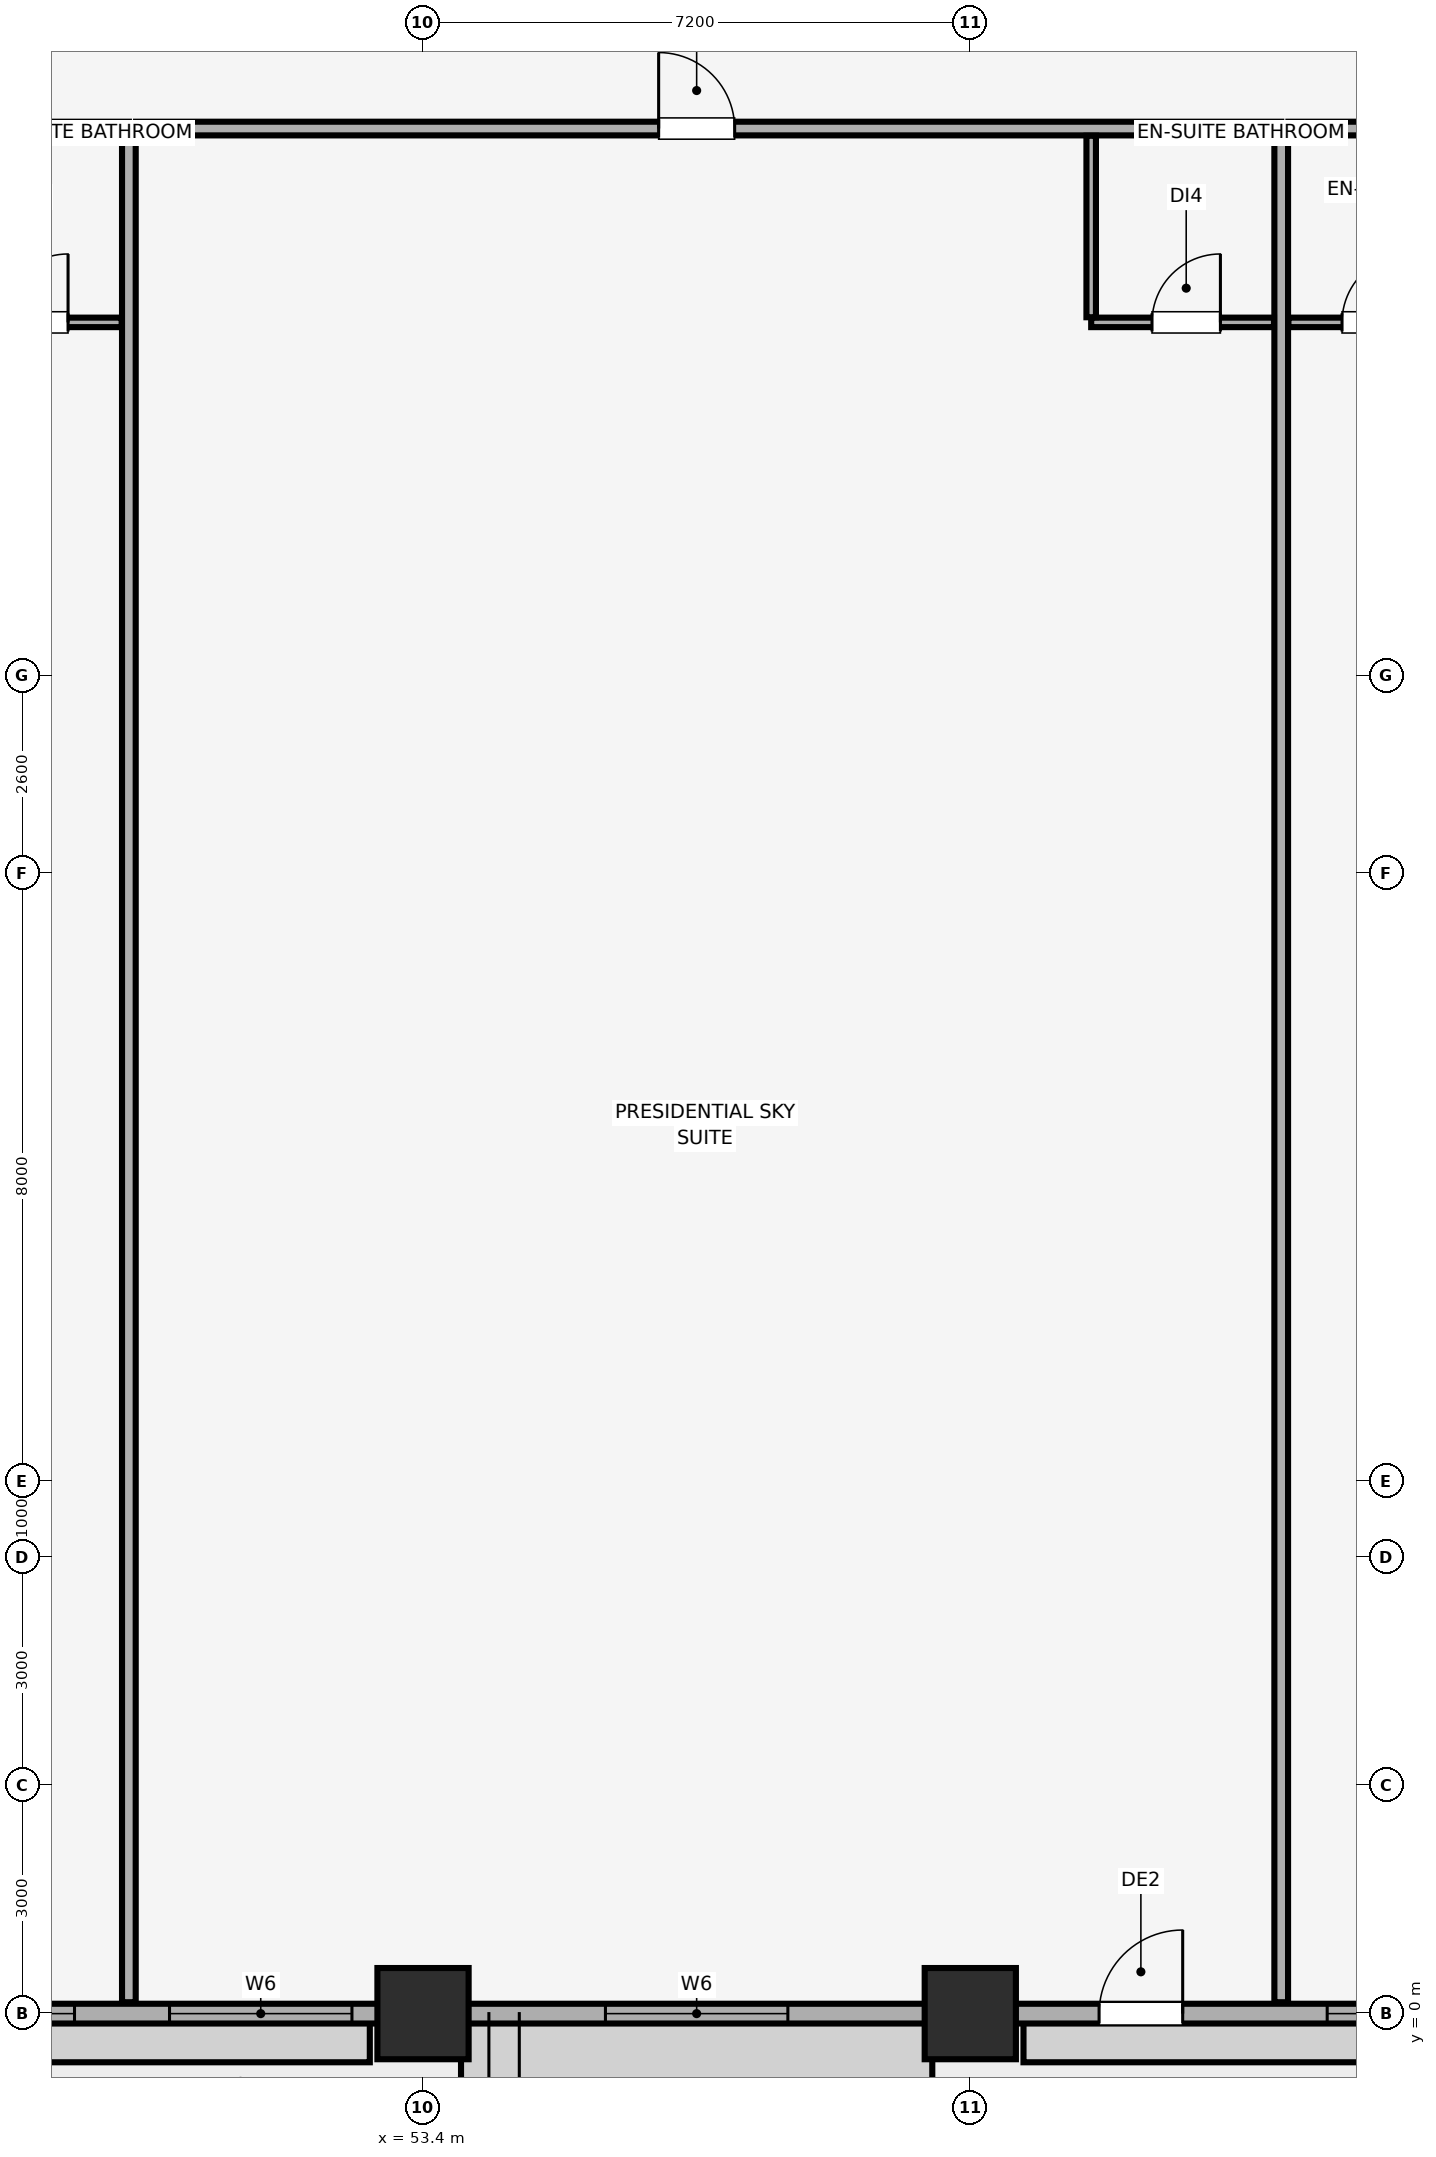
"""IFC4 building model, lengths in metres.
Left out: names, types, materials, properties, quantities, classifications, styles, units other than length and angle.
Written with IfcOpenShell. Run it as: python <this file> out.ifc"""

import sys

from ifc_helpers import new_model, si_unit, direction, frame, frame_2d, origin, origin_2d, place, context, subcontext, project, spatial, rectangle, extrude, element, fill, save


model = new_model("IFC4")
c1 = context("Model", 3, precision=1e-05, world=origin(), true_north=direction((0.0, 1.0)))
c2 = subcontext(c1, "Body", "Model", "MODEL_VIEW")
j1 = project(units=[si_unit("LENGTHUNIT", "METRE"), si_unit("PLANEANGLEUNIT", "RADIAN")], contexts=[c1])
p1 = place(None, origin())
s1 = spatial("IfcSite", under=j1, at=p1, CompositionType="ELEMENT")
p2 = place(p1, origin())
s2 = spatial("IfcBuilding", under=s1, at=p2, CompositionType="ELEMENT")
p3 = place(p2, frame((0.0, 0.0, 126.8)))
s3 = spatial("IfcBuildingStorey", under=s2, at=p3, CompositionType="ELEMENT", Elevation=126.8)
for number, where, z_axis, x_axis in (
    (1, (53.4, 0.0, 0.0), (0.0, 0.0, 1.0), (1.0, 0.0, 0.0)),
    (2, (60.6, 0.0, 0.0), (0.0, 0.0, 1.0), (1.0, 0.0, 0.0)),
):
    element("IfcColumn", number, at=place(p3, frame(where, z_axis=z_axis, x_axis=x_axis)), inside=s3, PredefinedType="COLUMN", context=c2, shape_type="SweptSolid", body=[
        extrude(rectangle(XDim=1.2, YDim=1.2, at=origin_2d()), origin(), (0.0, 0.0, 1.0), 3.51),
    ])
p4 = place(p3, frame((4.2, 0.0, 0.0), z_axis=(0.0, 0.0, 1.0), x_axis=(1.0, 0.0, 0.0)))
e3 = element("IfcWall", 3, at=p4, inside=s3, PredefinedType="SOLIDWALL", context=c2, shape_type="SweptSolid", body=[
    extrude(rectangle(XDim=75.6, YDim=0.26, at=frame_2d((37.8, 0.0))), origin(), (0.0, 0.0, 1.0), 2.56),
])
p5 = place(p4, frame((21.383, 0.0, 0.0)))
e4 = element("IfcOpeningElement", 4, at=p5, cuts=e3, PredefinedType="OPENING", context=c2, shape_type="SweptSolid", body=[
    extrude(rectangle(XDim=1.1, YDim=2.15, at=frame_2d((0.55, 1.075))), frame((0.0, 0.14, 0.0), z_axis=(0.0, -1.0, 0.0), x_axis=(1.0, 0.0, 0.0)), (0.0, 0.0, 1.0), 0.28),
])
p6 = place(p4, frame((36.432, 0.0, 0.0)))
e5 = element("IfcOpeningElement", 5, at=p6, cuts=e3, PredefinedType="OPENING", context=c2, shape_type="SweptSolid", body=[
    extrude(rectangle(XDim=1.1, YDim=2.15, at=frame_2d((0.55, 1.075))), frame((0.0, 0.14, 0.0), z_axis=(0.0, -1.0, 0.0), x_axis=(1.0, 0.0, 0.0)), (0.0, 0.0, 1.0), 0.28),
])
p7 = place(p4, frame((58.094, 0.0, 0.0)))
e6 = element("IfcOpeningElement", 6, at=p7, cuts=e3, PredefinedType="OPENING", context=c2, shape_type="SweptSolid", body=[
    extrude(rectangle(XDim=1.1, YDim=2.15, at=frame_2d((0.55, 1.075))), frame((0.0, 0.14, 0.0), z_axis=(0.0, -1.0, 0.0), x_axis=(1.0, 0.0, 0.0)), (0.0, 0.0, 1.0), 0.28),
])
p8 = place(p4, frame((1.035, 0.0, 0.85)))
e7 = element("IfcOpeningElement", 7, at=p8, cuts=e3, PredefinedType="OPENING", context=c2, shape_type="SweptSolid", body=[
    extrude(rectangle(XDim=2.4, YDim=1.5, at=frame_2d((1.2, 0.75))), frame((0.0, 0.14, 0.0), z_axis=(0.0, -1.0, 0.0), x_axis=(1.0, 0.0, 0.0)), (0.0, 0.0, 1.0), 0.28),
])
p9 = place(p4, frame((7.2, 0.0, 0.85)))
e8 = element("IfcOpeningElement", 8, at=p9, cuts=e3, PredefinedType="OPENING", context=c2, shape_type="SweptSolid", body=[
    extrude(rectangle(XDim=2.4, YDim=1.5, at=frame_2d((1.2, 0.75))), frame((0.0, 0.14, 0.0), z_axis=(0.0, -1.0, 0.0), x_axis=(1.0, 0.0, 0.0)), (0.0, 0.0, 1.0), 0.28),
])
p10 = place(p4, frame((13.055, 0.0, 0.85)))
e9 = element("IfcOpeningElement", 9, at=p10, cuts=e3, PredefinedType="OPENING", context=c2, shape_type="SweptSolid", body=[
    extrude(rectangle(XDim=1.5, YDim=1.4, at=frame_2d((0.75, 0.7))), frame((0.0, 0.14, 0.0), z_axis=(0.0, -1.0, 0.0), x_axis=(1.0, 0.0, 0.0)), (0.0, 0.0, 1.0), 0.28),
])
p11 = place(p4, frame((15.805, 0.0, 0.85)))
e10 = element("IfcOpeningElement", 10, at=p11, cuts=e3, PredefinedType="OPENING", context=c2, shape_type="SweptSolid", body=[
    extrude(rectangle(XDim=2.4, YDim=1.5, at=frame_2d((1.2, 0.75))), frame((0.0, 0.14, 0.0), z_axis=(0.0, -1.0, 0.0), x_axis=(1.0, 0.0, 0.0)), (0.0, 0.0, 1.0), 0.28),
])
p12 = place(p4, frame((23.127, 0.0, 0.85)))
e11 = element("IfcOpeningElement", 11, at=p12, cuts=e3, PredefinedType="OPENING", context=c2, shape_type="SweptSolid", body=[
    extrude(rectangle(XDim=2.4, YDim=1.5, at=frame_2d((1.2, 0.75))), frame((0.0, 0.14, 0.0), z_axis=(0.0, -1.0, 0.0), x_axis=(1.0, 0.0, 0.0)), (0.0, 0.0, 1.0), 0.28),
])
p13 = place(p4, frame((27.285, 0.0, 0.85)))
e12 = element("IfcOpeningElement", 12, at=p13, cuts=e3, PredefinedType="OPENING", context=c2, shape_type="SweptSolid", body=[
    extrude(rectangle(XDim=2.4, YDim=1.5, at=frame_2d((1.2, 0.75))), frame((0.0, 0.14, 0.0), z_axis=(0.0, -1.0, 0.0), x_axis=(1.0, 0.0, 0.0)), (0.0, 0.0, 1.0), 0.28),
])
p14 = place(p4, frame((30.935, 0.0, 0.85)))
e13 = element("IfcOpeningElement", 13, at=p14, cuts=e3, PredefinedType="OPENING", context=c2, shape_type="SweptSolid", body=[
    extrude(rectangle(XDim=1.5, YDim=1.4, at=frame_2d((0.75, 0.7))), frame((0.0, 0.14, 0.0), z_axis=(0.0, -1.0, 0.0), x_axis=(1.0, 0.0, 0.0)), (0.0, 0.0, 1.0), 0.28),
])
p15 = place(p4, frame((38.451, 0.0, 0.85)))
e14 = element("IfcOpeningElement", 14, at=p15, cuts=e3, PredefinedType="OPENING", context=c2, shape_type="SweptSolid", body=[
    extrude(rectangle(XDim=2.4, YDim=1.5, at=frame_2d((1.2, 0.75))), frame((0.0, 0.14, 0.0), z_axis=(0.0, -1.0, 0.0), x_axis=(1.0, 0.0, 0.0)), (0.0, 0.0, 1.0), 0.28),
])
p16 = place(p4, frame((43.115, 0.0, 0.85)))
e15 = element("IfcOpeningElement", 15, at=p16, cuts=e3, PredefinedType="OPENING", context=c2, shape_type="SweptSolid", body=[
    extrude(rectangle(XDim=1.5, YDim=1.4, at=frame_2d((0.75, 0.7))), frame((0.0, 0.14, 0.0), z_axis=(0.0, -1.0, 0.0), x_axis=(1.0, 0.0, 0.0)), (0.0, 0.0, 1.0), 0.28),
])
p17 = place(p4, frame((45.865, 0.0, 0.85)))
e16 = element("IfcOpeningElement", 16, at=p17, cuts=e3, PredefinedType="OPENING", context=c2, shape_type="SweptSolid", body=[
    extrude(rectangle(XDim=2.4, YDim=1.5, at=frame_2d((1.2, 0.75))), frame((0.0, 0.14, 0.0), z_axis=(0.0, -1.0, 0.0), x_axis=(1.0, 0.0, 0.0)), (0.0, 0.0, 1.0), 0.28),
])
p18 = place(p4, frame((51.6, 0.0, 0.85)))
e17 = element("IfcOpeningElement", 17, at=p18, cuts=e3, PredefinedType="OPENING", context=c2, shape_type="SweptSolid", body=[
    extrude(rectangle(XDim=2.4, YDim=1.5, at=frame_2d((1.2, 0.75))), frame((0.0, 0.14, 0.0), z_axis=(0.0, -1.0, 0.0), x_axis=(1.0, 0.0, 0.0)), (0.0, 0.0, 1.0), 0.28),
])
p19 = place(p4, frame((61.095, 0.0, 0.85)))
e18 = element("IfcOpeningElement", 18, at=p19, cuts=e3, PredefinedType="OPENING", context=c2, shape_type="SweptSolid", body=[
    extrude(rectangle(XDim=1.5, YDim=1.4, at=frame_2d((0.75, 0.7))), frame((0.0, 0.14, 0.0), z_axis=(0.0, -1.0, 0.0), x_axis=(1.0, 0.0, 0.0)), (0.0, 0.0, 1.0), 0.28),
])
p20 = place(p4, frame((66.0, 0.0, 0.85)))
e19 = element("IfcOpeningElement", 19, at=p20, cuts=e3, PredefinedType="OPENING", context=c2, shape_type="SweptSolid", body=[
    extrude(rectangle(XDim=2.4, YDim=1.5, at=frame_2d((1.2, 0.75))), frame((0.0, 0.14, 0.0), z_axis=(0.0, -1.0, 0.0), x_axis=(1.0, 0.0, 0.0)), (0.0, 0.0, 1.0), 0.28),
])
p21 = place(p4, frame((72.165, 0.0, 0.85)))
e20 = element("IfcOpeningElement", 20, at=p21, cuts=e3, PredefinedType="OPENING", context=c2, shape_type="SweptSolid", body=[
    extrude(rectangle(XDim=2.4, YDim=1.5, at=frame_2d((1.2, 0.75))), frame((0.0, 0.14, 0.0), z_axis=(0.0, -1.0, 0.0), x_axis=(1.0, 0.0, 0.0)), (0.0, 0.0, 1.0), 0.28),
])
p22 = place(p3, frame((34.465, 24.8, 0.0), z_axis=(0.0, 0.0, 1.0), x_axis=(1.0, 0.0, 0.0)))
e21 = element("IfcWall", 21, at=p22, inside=s3, PredefinedType="PARTITIONING", context=c2, shape_type="SweptSolid", body=[
    extrude(rectangle(XDim=15.065, YDim=0.18, at=frame_2d((7.533, 0.0))), origin(), (0.0, 0.0, 1.0), 3.51),
])
p23 = place(p22, frame((7.035, 0.0, 0.0)))
e22 = element("IfcOpeningElement", 22, at=p23, cuts=e21, PredefinedType="OPENING", context=c2, shape_type="SweptSolid", body=[
    extrude(rectangle(XDim=1.0, YDim=2.15, at=frame_2d((0.5, 1.075))), frame((0.0, 0.1, 0.0), z_axis=(0.0, -1.0, 0.0), x_axis=(1.0, 0.0, 0.0)), (0.0, 0.0, 1.0), 0.2),
])
p24 = place(p3, frame((49.53, 0.15, 0.0), z_axis=(0.0, 0.0, 1.0), x_axis=(0.0, 1.0, 0.0)))
e23 = element("IfcWall", 23, at=p24, inside=s3, PredefinedType="PARTITIONING", context=c2, shape_type="SweptSolid", body=[
    extrude(rectangle(XDim=24.555, YDim=0.18, at=frame_2d((12.278, 0.0))), origin(), (0.0, 0.0, 1.0), 2.91),
])
p25 = place(p3, frame((47.03, 22.25, 0.0), z_axis=(0.0, 0.0, 1.0), x_axis=(1.0, 0.0, 0.0)))
e24 = element("IfcWall", 24, at=p25, inside=s3, PredefinedType="PARTITIONING", context=c2, shape_type="SweptSolid", body=[
    extrude(rectangle(XDim=2.405, YDim=0.125, at=frame_2d((1.203, 0.0))), origin(), (0.0, 0.0, 1.0), 3.51),
])
p26 = place(p25, frame((0.8, 0.0, 0.0)))
e25 = element("IfcOpeningElement", 25, at=p26, cuts=e24, PredefinedType="OPENING", context=c2, shape_type="SweptSolid", body=[
    extrude(rectangle(XDim=0.9, YDim=2.1, at=frame_2d((0.45, 1.05))), frame((0.0, 0.073, 0.0), z_axis=(0.0, -1.0, 0.0), x_axis=(1.0, 0.0, 0.0)), (0.0, 0.0, 1.0), 0.145),
])
p27 = place(p3, frame((49.625, 24.8, 0.0), z_axis=(0.0, 0.0, 1.0), x_axis=(1.0, 0.0, 0.0)))
e26 = element("IfcWall", 26, at=p27, inside=s3, PredefinedType="PARTITIONING", context=c2, shape_type="SweptSolid", body=[
    extrude(rectangle(XDim=15.066, YDim=0.18, at=frame_2d((7.533, 0.0))), origin(), (0.0, 0.0, 1.0), 3.51),
])
p28 = place(p27, frame((6.875, 0.0, 0.0)))
e27 = element("IfcOpeningElement", 27, at=p28, cuts=e26, PredefinedType="OPENING", context=c2, shape_type="SweptSolid", body=[
    extrude(rectangle(XDim=1.0, YDim=2.15, at=frame_2d((0.5, 1.075))), frame((0.0, 0.1, 0.0), z_axis=(0.0, -1.0, 0.0), x_axis=(1.0, 0.0, 0.0)), (0.0, 0.0, 1.0), 0.2),
])
p29 = place(p3, frame((64.691, 0.15, 0.0), z_axis=(0.0, 0.0, 1.0), x_axis=(0.0, 1.0, 0.0)))
e28 = element("IfcWall", 28, at=p29, inside=s3, PredefinedType="PARTITIONING", context=c2, shape_type="SweptSolid", body=[
    extrude(rectangle(XDim=24.555, YDim=0.18, at=frame_2d((12.278, 0.0))), origin(), (0.0, 0.0, 1.0), 3.51),
])
p30 = place(p3, frame((62.191, 22.25, 0.0), z_axis=(0.0, 0.0, 1.0), x_axis=(1.0, 0.0, 0.0)))
e29 = element("IfcWall", 29, at=p30, inside=s3, PredefinedType="PARTITIONING", context=c2, shape_type="SweptSolid", body=[
    extrude(rectangle(XDim=2.405, YDim=0.125, at=frame_2d((1.203, 0.0))), origin(), (0.0, 0.0, 1.0), 3.51),
])
p31 = place(p30, frame((0.8, 0.0, 0.0)))
e30 = element("IfcOpeningElement", 30, at=p31, cuts=e29, PredefinedType="OPENING", context=c2, shape_type="SweptSolid", body=[
    extrude(rectangle(XDim=0.9, YDim=2.1, at=frame_2d((0.45, 1.05))), frame((0.0, 0.073, 0.0), z_axis=(0.0, -1.0, 0.0), x_axis=(1.0, 0.0, 0.0)), (0.0, 0.0, 1.0), 0.145),
])
p32 = place(p3, frame((62.191, 22.317, 0.0), z_axis=(0.0, 0.0, 1.0), x_axis=(0.0, 1.0, 0.0)))
e31 = element("IfcWall", 31, at=p32, inside=s3, PredefinedType="PARTITIONING", context=c2, shape_type="SweptSolid", body=[
    extrude(rectangle(XDim=2.388, YDim=0.125, at=frame_2d((1.194, 0.0))), origin(), (0.0, 0.0, 1.0), 3.51),
])
p33 = place(p3, frame((64.786, 24.8, 0.0), z_axis=(0.0, 0.0, 1.0), x_axis=(1.0, 0.0, 0.0)))
e32 = element("IfcWall", 32, at=p33, inside=s3, PredefinedType="PARTITIONING", context=c2, shape_type="SweptSolid", body=[
    extrude(rectangle(XDim=19.064, YDim=0.18, at=frame_2d((9.532, 0.0))), origin(), (0.0, 0.0, 1.0), 3.51),
])
p34 = place(p33, frame((6.115, 0.0, 0.0)))
e33 = element("IfcOpeningElement", 33, at=p34, cuts=e32, PredefinedType="OPENING", context=c2, shape_type="SweptSolid", body=[
    extrude(rectangle(XDim=1.0, YDim=2.15, at=frame_2d((0.5, 1.075))), frame((0.0, 0.1, 0.0), z_axis=(0.0, -1.0, 0.0), x_axis=(1.0, 0.0, 0.0)), (0.0, 0.0, 1.0), 0.2),
])
p35 = place(p3, frame((64.786, 22.25, 0.0), z_axis=(0.0, 0.0, 1.0), x_axis=(1.0, 0.0, 0.0)))
e34 = element("IfcWall", 34, at=p35, inside=s3, PredefinedType="PARTITIONING", context=c2, shape_type="SweptSolid", body=[
    extrude(rectangle(XDim=2.405, YDim=0.125, at=frame_2d((1.203, 0.0))), origin(), (0.0, 0.0, 1.0), 3.51),
])
p36 = place(p35, frame((0.705, 0.0, 0.0)))
e35 = element("IfcOpeningElement", 35, at=p36, cuts=e34, PredefinedType="OPENING", context=c2, shape_type="SweptSolid", body=[
    extrude(rectangle(XDim=0.9, YDim=2.1, at=frame_2d((0.45, 1.05))), frame((0.0, 0.073, 0.0), z_axis=(0.0, -1.0, 0.0), x_axis=(1.0, 0.0, 0.0)), (0.0, 0.0, 1.0), 0.145),
])
p37 = place(p7, origin())
e36 = element("IfcDoor", 36, at=p37, inside=s3, OperationType="SINGLE_SWING_RIGHT", PredefinedType="DOOR", context=c2, shape_type="SweptSolid", body=[
    extrude(rectangle(XDim=1.1, YDim=2.15, at=frame_2d((0.55, 1.075))), frame((0.0, 0.025, 0.0), z_axis=(0.0, -1.0, 0.0), x_axis=(1.0, 0.0, 0.0)), (0.0, 0.0, 1.0), 0.05),
])
fill(e6, e36)
p38 = place(p16, origin())
e37 = element("IfcWindow", 37, at=p38, inside=s3, PartitioningType="SINGLE_PANEL", PredefinedType="WINDOW", context=c2, shape_type="SweptSolid", body=[
    extrude(rectangle(XDim=1.5, YDim=1.4, at=frame_2d((0.75, 0.7))), frame((0.0, 0.03, 0.0), z_axis=(0.0, -1.0, 0.0), x_axis=(1.0, 0.0, 0.0)), (0.0, 0.0, 1.0), 0.06),
])
fill(e15, e37)
p39 = place(p17, origin())
e38 = element("IfcWindow", 38, at=p39, inside=s3, PartitioningType="SINGLE_PANEL", PredefinedType="WINDOW", context=c2, shape_type="SweptSolid", body=[
    extrude(rectangle(XDim=2.4, YDim=1.5, at=frame_2d((1.2, 0.75))), frame((0.0, 0.03, 0.0), z_axis=(0.0, -1.0, 0.0), x_axis=(1.0, 0.0, 0.0)), (0.0, 0.0, 1.0), 0.06),
])
fill(e16, e38)
p40 = place(p18, origin())
e39 = element("IfcWindow", 39, at=p40, inside=s3, PartitioningType="SINGLE_PANEL", PredefinedType="WINDOW", context=c2, shape_type="SweptSolid", body=[
    extrude(rectangle(XDim=2.4, YDim=1.5, at=frame_2d((1.2, 0.75))), frame((0.0, 0.03, 0.0), z_axis=(0.0, -1.0, 0.0), x_axis=(1.0, 0.0, 0.0)), (0.0, 0.0, 1.0), 0.06),
])
fill(e17, e39)
p41 = place(p19, origin())
e40 = element("IfcWindow", 40, at=p41, inside=s3, PartitioningType="SINGLE_PANEL", PredefinedType="WINDOW", context=c2, shape_type="SweptSolid", body=[
    extrude(rectangle(XDim=1.5, YDim=1.4, at=frame_2d((0.75, 0.7))), frame((0.0, 0.03, 0.0), z_axis=(0.0, -1.0, 0.0), x_axis=(1.0, 0.0, 0.0)), (0.0, 0.0, 1.0), 0.06),
])
fill(e18, e40)
p42 = place(p26, origin())
e41 = element("IfcDoor", 41, at=p42, inside=s3, OperationType="SINGLE_SWING_RIGHT", PredefinedType="DOOR", context=c2, shape_type="SweptSolid", body=[
    extrude(rectangle(XDim=0.9, YDim=2.1, at=frame_2d((0.45, 1.05))), frame((0.0, 0.025, 0.0), z_axis=(0.0, -1.0, 0.0), x_axis=(1.0, 0.0, 0.0)), (0.0, 0.0, 1.0), 0.05),
])
fill(e25, e41)
p43 = place(p28, origin())
e42 = element("IfcDoor", 42, at=p43, inside=s3, OperationType="SINGLE_SWING_LEFT", PredefinedType="DOOR", context=c2, shape_type="SweptSolid", body=[
    extrude(rectangle(XDim=1.0, YDim=2.15, at=frame_2d((0.5, 1.075))), frame((0.0, 0.025, 0.0), z_axis=(0.0, -1.0, 0.0), x_axis=(1.0, 0.0, 0.0)), (0.0, 0.0, 1.0), 0.05),
])
fill(e27, e42)
p44 = place(p31, origin())
e43 = element("IfcDoor", 43, at=p44, inside=s3, OperationType="SINGLE_SWING_RIGHT", PredefinedType="DOOR", context=c2, shape_type="SweptSolid", body=[
    extrude(rectangle(XDim=0.9, YDim=2.1, at=frame_2d((0.45, 1.05))), frame((0.0, 0.025, 0.0), z_axis=(0.0, -1.0, 0.0), x_axis=(1.0, 0.0, 0.0)), (0.0, 0.0, 1.0), 0.05),
])
fill(e30, e43)
p45 = place(p36, origin())
e44 = element("IfcDoor", 44, at=p45, inside=s3, OperationType="SINGLE_SWING_RIGHT", PredefinedType="DOOR", context=c2, shape_type="SweptSolid", body=[
    extrude(rectangle(XDim=0.9, YDim=2.1, at=frame_2d((0.45, 1.05))), frame((0.0, 0.025, 0.0), z_axis=(0.0, -1.0, 0.0), x_axis=(1.0, 0.0, 0.0)), (0.0, 0.0, 1.0), 0.05),
])
fill(e35, e44)
save(model, sys.argv[1])
